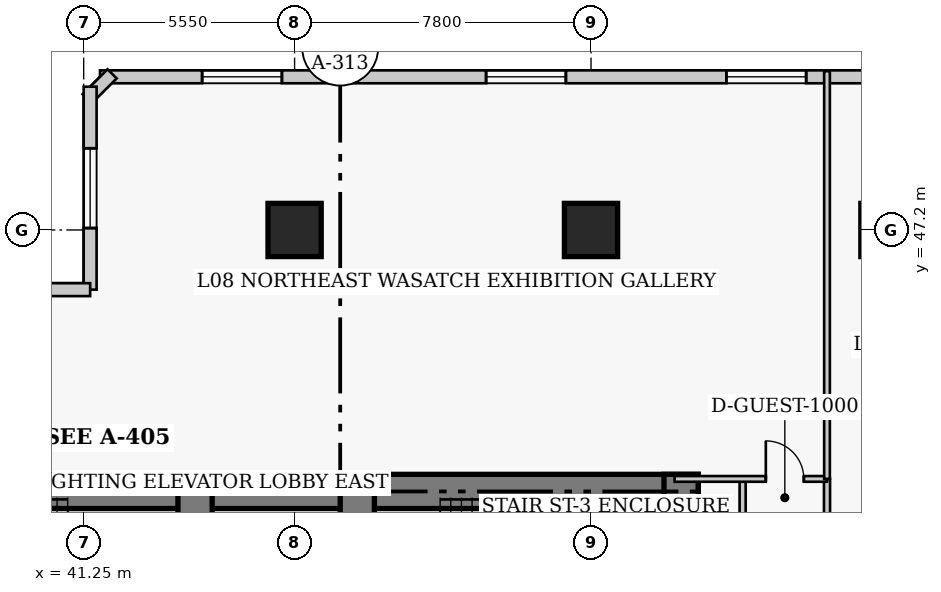
"""IFC4 building model, lengths in metres.
Left out: names, types, materials, properties, quantities, classifications, styles, units other than length and angle.
Written with IfcOpenShell. Run it as: python <this file> out.ifc"""

import sys

from ifc_helpers import new_model, si_unit, direction, frame, frame_2d, origin, origin_2d, place, context, subcontext, project, spatial, rectangle, extrude, element, fill, save


model = new_model("IFC4")
c1 = context("Model", 3, precision=1e-05, world=origin(), true_north=direction((0.0, 1.0)))
c2 = subcontext(c1, "Body", "Model", "MODEL_VIEW")
j1 = project(units=[si_unit("LENGTHUNIT", "METRE"), si_unit("PLANEANGLEUNIT", "RADIAN")], contexts=[c1])
p1 = place(None, origin())
s1 = spatial("IfcSite", under=j1, at=p1, CompositionType="ELEMENT")
p2 = place(p1, origin())
s2 = spatial("IfcBuilding", under=s1, at=p2, CompositionType="ELEMENT")
p3 = place(p2, frame((0.0, 0.0, 37.4)))
s3 = spatial("IfcBuildingStorey", under=s2, at=p3, CompositionType="ELEMENT", Elevation=37.4)
p4 = place(p3, frame((35.85, 40.32, 0.0), z_axis=(0.0, 0.0, 1.0), x_axis=(1.0, 0.0, 0.0)))
e1 = element("IfcWall", 1, at=p4, inside=s3, PredefinedType="SHEAR", context=c2, shape_type="SweptSolid", body=[
    extrude(rectangle(XDim=12.6, YDim=0.9, at=frame_2d((6.3, 0.0))), origin(), (0.0, 0.0, 1.0), 3.8),
])
p5 = place(p3, frame((48.45, 40.32, 0.0), z_axis=(0.0, 0.0, 1.0), x_axis=(1.0, 0.0, 0.0)))
e2 = element("IfcWall", 2, at=p5, inside=s3, PredefinedType="SHEAR", context=c2, shape_type="SweptSolid", body=[
    extrude(rectangle(XDim=8.97, YDim=0.9, at=frame_2d((4.485, 0.0))), origin(), (0.0, 0.0, 1.0), 3.8),
])
p6 = place(p3, frame((56.97, 27.05, 0.0), z_axis=(0.0, 0.0, 1.0), x_axis=(0.0, 1.0, 0.0)))
e3 = element("IfcWall", 3, at=p6, inside=s3, PredefinedType="SHEAR", context=c2, shape_type="SweptSolid", body=[
    extrude(rectangle(XDim=13.72, YDim=0.9, at=frame_2d((6.86, 0.0))), origin(), (0.0, 0.0, 1.0), 3.8),
])
p7 = place(p3, frame((44.18, 36.37, 0.0), z_axis=(0.0, 0.0, 1.0), x_axis=(0.0, 1.0, 0.0)))
e4 = element("IfcWall", 4, at=p7, inside=s3, PredefinedType="SHEAR", context=c2, shape_type="SweptSolid", body=[
    extrude(rectangle(XDim=3.95, YDim=0.9, at=frame_2d((1.975, 0.0))), origin(), (0.0, 0.0, 1.0), 3.8),
])
p8 = place(p3, frame((48.45, 32.3, 0.0), z_axis=(0.0, 0.0, 1.0), x_axis=(0.0, 1.0, 0.0)))
e5 = element("IfcWall", 5, at=p8, inside=s3, PredefinedType="SHEAR", context=c2, shape_type="SweptSolid", body=[
    extrude(rectangle(XDim=8.02, YDim=0.9, at=frame_2d((4.01, 0.0))), origin(), (0.0, 0.0, 1.0), 3.8),
])
p9 = place(p8, frame((5.9, 0.0, 0.0)))
e6 = element("IfcOpeningElement", 6, at=p9, cuts=e5, PredefinedType="OPENING", context=c2, shape_type="SweptSolid", body=[
    extrude(rectangle(XDim=1.1, YDim=2.15, at=frame_2d((0.55, 1.075))), frame((0.0, 0.46, 0.0), z_axis=(0.0, -1.0, 0.0), x_axis=(1.0, 0.0, 0.0)), (0.0, 0.0, 1.0), 0.92),
])
for number, where, z_axis, x_axis in (
    (7, (46.8, 47.2, 0.0), (0.0, 0.0, 1.0), (1.0, 0.0, 0.0)),
    (8, (54.6, 47.2, 0.0), (0.0, 0.0, 1.0), (1.0, 0.0, 0.0)),
):
    element("IfcColumn", number, at=place(p3, frame(where, z_axis=z_axis, x_axis=x_axis)), inside=s3, PredefinedType="COLUMN", context=c2, shape_type="SweptSolid", body=[
        extrude(rectangle(XDim=1.4, YDim=1.4, at=origin_2d()), origin(), (0.0, 0.0, 1.0), 3.8),
    ])
p10 = place(p3, frame((71.57, 51.23, 0.0), z_axis=(0.0, 0.0, 1.0), x_axis=(-1.0, 0.0, 0.0)))
e9 = element("IfcWall", 9, at=p10, inside=s3, PredefinedType="SOLIDWALL", context=c2, shape_type="SweptSolid", body=[
    extrude(rectangle(XDim=29.89, YDim=0.34, at=frame_2d((14.945, 0.0))), origin(), (0.0, 0.0, 1.0), 3.54),
])
p11 = place(p10, frame((2.686, 0.0, 0.85)))
e10 = element("IfcOpeningElement", 10, at=p11, cuts=e9, PredefinedType="OPENING", context=c2, shape_type="SweptSolid", body=[
    extrude(rectangle(XDim=2.1, YDim=1.85, at=frame_2d((1.05, 0.925))), frame((0.0, 0.18, 0.0), z_axis=(0.0, -1.0, 0.0), x_axis=(1.0, 0.0, 0.0)), (0.0, 0.0, 1.0), 0.36),
])
p12 = place(p10, frame((11.309, 0.0, 0.85)))
e11 = element("IfcOpeningElement", 11, at=p12, cuts=e9, PredefinedType="OPENING", context=c2, shape_type="SweptSolid", body=[
    extrude(rectangle(XDim=2.1, YDim=1.85, at=frame_2d((1.05, 0.925))), frame((0.0, 0.18, 0.0), z_axis=(0.0, -1.0, 0.0), x_axis=(1.0, 0.0, 0.0)), (0.0, 0.0, 1.0), 0.36),
])
p13 = place(p10, frame((17.631, 0.0, 0.85)))
e12 = element("IfcOpeningElement", 12, at=p13, cuts=e9, PredefinedType="OPENING", context=c2, shape_type="SweptSolid", body=[
    extrude(rectangle(XDim=2.1, YDim=1.85, at=frame_2d((1.05, 0.925))), frame((0.0, 0.18, 0.0), z_axis=(0.0, -1.0, 0.0), x_axis=(1.0, 0.0, 0.0)), (0.0, 0.0, 1.0), 0.36),
])
p14 = place(p10, frame((25.104, 0.0, 0.85)))
e13 = element("IfcOpeningElement", 13, at=p14, cuts=e9, PredefinedType="OPENING", context=c2, shape_type="SweptSolid", body=[
    extrude(rectangle(XDim=2.1, YDim=1.85, at=frame_2d((1.05, 0.925))), frame((0.0, 0.18, 0.0), z_axis=(0.0, -1.0, 0.0), x_axis=(1.0, 0.0, 0.0)), (0.0, 0.0, 1.0), 0.36),
])
p15 = place(p3, frame((41.999, 51.308, 0.0), z_axis=(0.0, 0.0, 1.0), x_axis=(-0.707238225886, -0.706975312048, 0.0)))
e14 = element("IfcWall", 14, at=p15, inside=s3, PredefinedType="SOLIDWALL", context=c2, shape_type="SweptSolid", body=[
    extrude(rectangle(XDim=0.929, YDim=0.34, at=frame_2d((0.464, 0.0))), origin(), (0.0, 0.0, 1.0), 3.54),
])
p16 = place(p3, frame((41.42, 50.97, 0.0), z_axis=(0.0, 0.0, 1.0), x_axis=(0.0, -1.0, 0.0)))
e15 = element("IfcWall", 15, at=p16, inside=s3, PredefinedType="SOLIDWALL", context=c2, shape_type="SweptSolid", body=[
    extrude(rectangle(XDim=5.34, YDim=0.34, at=frame_2d((2.67, 0.0))), origin(), (0.0, 0.0, 1.0), 3.54),
])
p17 = place(p16, frame((1.62, 0.0, 0.85)))
e16 = element("IfcOpeningElement", 16, at=p17, cuts=e15, PredefinedType="OPENING", context=c2, shape_type="SweptSolid", body=[
    extrude(rectangle(XDim=2.1, YDim=1.85, at=frame_2d((1.05, 0.925))), frame((0.0, 0.18, 0.0), z_axis=(0.0, -1.0, 0.0), x_axis=(1.0, 0.0, 0.0)), (0.0, 0.0, 1.0), 0.36),
])
p18 = place(p3, frame((41.42, 45.63, 0.0), z_axis=(0.0, 0.0, 1.0), x_axis=(-1.0, 0.0, 0.0)))
e17 = element("IfcWall", 17, at=p18, inside=s3, PredefinedType="SOLIDWALL", context=c2, shape_type="SweptSolid", body=[
    extrude(rectangle(XDim=4.84, YDim=0.34, at=frame_2d((2.42, 0.0))), origin(), (0.0, 0.0, 1.0), 3.54),
])
p19 = place(p18, frame((1.37, 0.0, 0.85)))
e18 = element("IfcOpeningElement", 18, at=p19, cuts=e17, PredefinedType="OPENING", context=c2, shape_type="SweptSolid", body=[
    extrude(rectangle(XDim=2.1, YDim=1.85, at=frame_2d((1.05, 0.925))), frame((0.0, 0.18, 0.0), z_axis=(0.0, -1.0, 0.0), x_axis=(1.0, 0.0, 0.0)), (0.0, 0.0, 1.0), 0.36),
])
p20 = place(p3, frame((60.81, 10.25, 0.0), z_axis=(0.0, 0.0, 1.0), x_axis=(0.0, 1.0, 0.0)))
e19 = element("IfcWall", 19, at=p20, inside=s3, PredefinedType="PARTITIONING", context=c2, shape_type="SweptSolid", body=[
    extrude(rectangle(XDim=30.4, YDim=0.16, at=frame_2d((15.2, 0.0))), origin(), (0.0, 0.0, 1.0), 3.54),
])
p21 = place(p20, frame((4.4, 0.0, 0.0)))
e20 = element("IfcOpeningElement", 20, at=p21, cuts=e19, PredefinedType="OPENING", context=c2, shape_type="SweptSolid", body=[
    extrude(rectangle(XDim=0.95, YDim=2.1, at=frame_2d((0.475, 1.05))), frame((0.0, 0.09, 0.0), z_axis=(0.0, -1.0, 0.0), x_axis=(1.0, 0.0, 0.0)), (0.0, 0.0, 1.0), 0.18),
])
p22 = place(p20, frame((13.175, 0.0, 0.0)))
e21 = element("IfcOpeningElement", 21, at=p22, cuts=e19, PredefinedType="OPENING", context=c2, shape_type="SweptSolid", body=[
    extrude(rectangle(XDim=0.95, YDim=2.1, at=frame_2d((0.475, 1.05))), frame((0.0, 0.09, 0.0), z_axis=(0.0, -1.0, 0.0), x_axis=(1.0, 0.0, 0.0)), (0.0, 0.0, 1.0), 0.18),
])
p23 = place(p20, frame((20.975, 0.0, 0.0)))
e22 = element("IfcOpeningElement", 22, at=p23, cuts=e19, PredefinedType="OPENING", context=c2, shape_type="SweptSolid", body=[
    extrude(rectangle(XDim=0.95, YDim=2.1, at=frame_2d((0.475, 1.05))), frame((0.0, 0.09, 0.0), z_axis=(0.0, -1.0, 0.0), x_axis=(1.0, 0.0, 0.0)), (0.0, 0.0, 1.0), 0.18),
])
p24 = place(p20, frame((25.9, 0.0, 0.0)))
e23 = element("IfcOpeningElement", 23, at=p24, cuts=e19, PredefinedType="OPENING", context=c2, shape_type="SweptSolid", body=[
    extrude(rectangle(XDim=1.0, YDim=2.15, at=frame_2d((0.5, 1.075))), frame((0.0, 0.09, 0.0), z_axis=(0.0, -1.0, 0.0), x_axis=(1.0, 0.0, 0.0)), (0.0, 0.0, 1.0), 0.18),
])
p25 = place(p3, frame((58.59, 26.41, 0.0), z_axis=(0.0, 0.0, 1.0), x_axis=(0.0, 1.0, 0.0)))
e24 = element("IfcWall", 24, at=p25, inside=s3, PredefinedType="PARTITIONING", context=c2, shape_type="SweptSolid", body=[
    extrude(rectangle(XDim=14.24, YDim=0.16, at=frame_2d((7.12, 0.0))), origin(), (0.0, 0.0, 1.0), 3.54),
])
p26 = place(p3, frame((56.8, 40.65, 0.0), z_axis=(0.0, 0.0, 1.0), x_axis=(1.0, 0.0, 0.0)))
e25 = element("IfcWall", 25, at=p26, inside=s3, PredefinedType="PARTITIONING", context=c2, shape_type="SweptSolid", body=[
    extrude(rectangle(XDim=4.01, YDim=0.15, at=frame_2d((2.005, 0.0))), origin(), (0.0, 0.0, 1.0), 3.54),
])
p27 = place(p26, frame((2.4, 0.0, 0.0)))
e26 = element("IfcOpeningElement", 26, at=p27, cuts=e25, PredefinedType="OPENING", context=c2, shape_type="SweptSolid", body=[
    extrude(rectangle(XDim=1.0, YDim=2.15, at=frame_2d((0.5, 1.075))), frame((0.0, 0.085, 0.0), z_axis=(0.0, -1.0, 0.0), x_axis=(1.0, 0.0, 0.0)), (0.0, 0.0, 1.0), 0.17),
])
p28 = place(p3, frame((60.81, 40.65, 0.0), z_axis=(0.0, 0.0, 1.0), x_axis=(0.0, 1.0, 0.0)))
e27 = element("IfcWall", 27, at=p28, inside=s3, PredefinedType="PARTITIONING", context=c2, shape_type="SweptSolid", body=[
    extrude(rectangle(XDim=10.73, YDim=0.15, at=frame_2d((5.365, 0.0))), origin(), (0.0, 0.0, 1.0), 3.54),
])
p29 = place(p12, origin())
e28 = element("IfcWindow", 28, at=p29, inside=s3, PartitioningType="SINGLE_PANEL", PredefinedType="WINDOW", context=c2, shape_type="SweptSolid", body=[
    extrude(rectangle(XDim=2.1, YDim=1.85, at=frame_2d((1.05, 0.925))), frame((0.0, 0.03, 0.0), z_axis=(0.0, -1.0, 0.0), x_axis=(1.0, 0.0, 0.0)), (0.0, 0.0, 1.0), 0.06),
])
fill(e11, e28)
p30 = place(p13, origin())
e29 = element("IfcWindow", 29, at=p30, inside=s3, PartitioningType="SINGLE_PANEL", PredefinedType="WINDOW", context=c2, shape_type="SweptSolid", body=[
    extrude(rectangle(XDim=2.1, YDim=1.85, at=frame_2d((1.05, 0.925))), frame((0.0, 0.03, 0.0), z_axis=(0.0, -1.0, 0.0), x_axis=(1.0, 0.0, 0.0)), (0.0, 0.0, 1.0), 0.06),
])
fill(e12, e29)
p31 = place(p14, origin())
e30 = element("IfcWindow", 30, at=p31, inside=s3, PartitioningType="SINGLE_PANEL", PredefinedType="WINDOW", context=c2, shape_type="SweptSolid", body=[
    extrude(rectangle(XDim=2.1, YDim=1.85, at=frame_2d((1.05, 0.925))), frame((0.0, 0.03, 0.0), z_axis=(0.0, -1.0, 0.0), x_axis=(1.0, 0.0, 0.0)), (0.0, 0.0, 1.0), 0.06),
])
fill(e13, e30)
p32 = place(p17, origin())
e31 = element("IfcWindow", 31, at=p32, inside=s3, PartitioningType="SINGLE_PANEL", PredefinedType="WINDOW", context=c2, shape_type="SweptSolid", body=[
    extrude(rectangle(XDim=2.1, YDim=1.85, at=frame_2d((1.05, 0.925))), frame((0.0, 0.03, 0.0), z_axis=(0.0, -1.0, 0.0), x_axis=(1.0, 0.0, 0.0)), (0.0, 0.0, 1.0), 0.06),
])
fill(e16, e31)
p33 = place(p27, origin())
e32 = element("IfcDoor", 32, at=p33, inside=s3, OperationType="SINGLE_SWING_LEFT", PredefinedType="DOOR", context=c2, shape_type="SweptSolid", body=[
    extrude(rectangle(XDim=1.0, YDim=2.15, at=frame_2d((0.5, 1.075))), frame((0.0, 0.025, 0.0), z_axis=(0.0, -1.0, 0.0), x_axis=(1.0, 0.0, 0.0)), (0.0, 0.0, 1.0), 0.05),
])
fill(e26, e32)
save(model, sys.argv[1])
